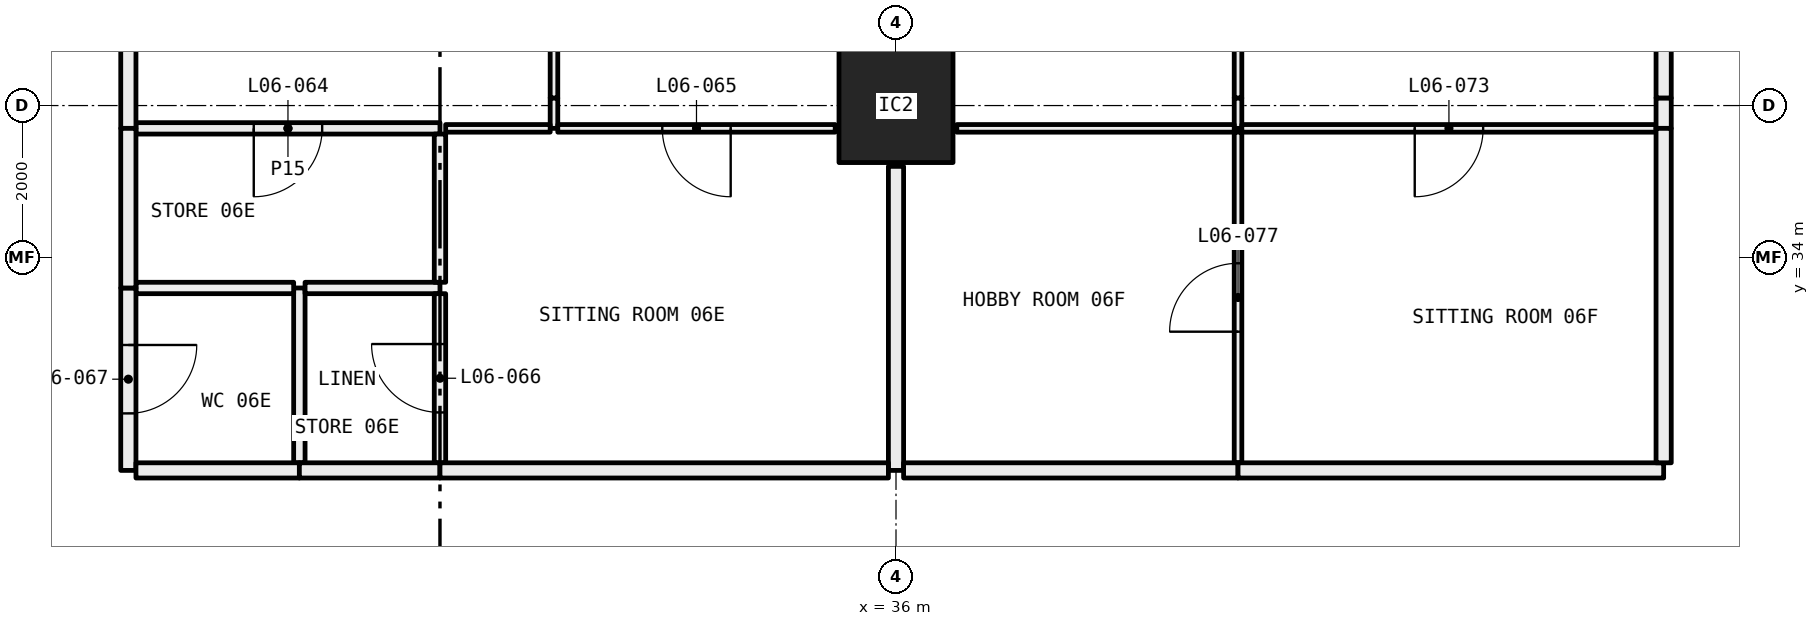
"""IFC4 building model, lengths in metres.
Left out: names, types, materials, properties, quantities, classifications, styles, units other than length and angle.
Written with IfcOpenShell. Run it as: python <this file> out.ifc"""

import sys

from ifc_helpers import new_model, si_unit, direction, frame, frame_2d, origin, origin_2d, place, context, subcontext, project, spatial, rectangle, hollow_rectangle, extrude, element, fill, save


model = new_model("IFC4")
c1 = context("Model", 3, precision=1e-05, world=origin(), true_north=direction((0.0, 1.0)))
c2 = subcontext(c1, "Body", "Model", "MODEL_VIEW")
j1 = project(units=[si_unit("LENGTHUNIT", "METRE"), si_unit("PLANEANGLEUNIT", "RADIAN")], contexts=[c1])
p1 = place(None, origin())
s1 = spatial("IfcSite", under=j1, at=p1, CompositionType="ELEMENT")
p2 = place(p1, origin())
s2 = spatial("IfcBuilding", under=s1, at=p2, CompositionType="ELEMENT")
p3 = place(p2, frame((0.0, 0.0, 33.45)))
s3 = spatial("IfcBuildingStorey", under=s2, at=p3, CompositionType="ELEMENT", Elevation=33.45)
p4 = place(p3, frame((36.0, 36.0, 0.0), z_axis=(0.0, 0.0, 1.0), x_axis=(1.0, 0.0, 0.0)))
e1 = element("IfcColumn", 1, at=p4, inside=s3, PredefinedType="COLUMN", context=c2, shape_type="SweptSolid", body=[
    extrude(hollow_rectangle(XDim=1.5, YDim=1.5, WallThickness=0.065, at=origin_2d()), origin(), (0.0, 0.0, 1.0), 3.05),
])
p5 = place(p3, frame((31.5, 35.7, 0.0), z_axis=(0.0, 0.0, 1.0), x_axis=(0.0, 1.0, 0.0)))
e2 = element("IfcWall", 2, at=p5, inside=s3, PredefinedType="PARTITIONING", context=c2, shape_type="SweptSolid", body=[
    extrude(rectangle(XDim=0.4, YDim=0.1, at=frame_2d((0.2, 0.0))), origin(), (0.0, 0.0, 1.0), 2.45),
])
p6 = place(p3, frame((31.5, 36.1, 0.0), z_axis=(0.0, 0.0, 1.0), x_axis=(0.0, 1.0, 0.0)))
e3 = element("IfcWall", 3, at=p6, inside=s3, PredefinedType="PARTITIONING", context=c2, shape_type="SweptSolid", body=[
    extrude(rectangle(XDim=5.825, YDim=0.1, at=frame_2d((2.913, 0.0))), origin(), (0.0, 0.0, 1.0), 3.05),
])
p7 = place(p6, frame((2.462, 0.0, 0.0)))
e4 = element("IfcOpeningElement", 4, at=p7, cuts=e3, PredefinedType="OPENING", context=c2, shape_type="SweptSolid", body=[
    extrude(rectangle(XDim=0.9, YDim=2.1, at=frame_2d((0.45, 1.05))), frame((0.0, 0.06, 0.0), z_axis=(0.0, -1.0, 0.0), x_axis=(1.0, 0.0, 0.0)), (0.0, 0.0, 1.0), 0.12),
])
p8 = place(p3, frame((26.0, 35.7, 0.0), z_axis=(0.0, 0.0, 1.0), x_axis=(1.0, 0.0, 0.0)))
e5 = element("IfcWall", 5, at=p8, inside=s3, PredefinedType="PARTITIONING", context=c2, shape_type="SweptSolid", body=[
    extrude(rectangle(XDim=4.0, YDim=0.15, at=frame_2d((2.0, 0.0))), origin(), (0.0, 0.0, 1.0), 3.05),
])
p9 = place(p8, frame((1.55, 0.0, 0.0)))
e6 = element("IfcOpeningElement", 6, at=p9, cuts=e5, PredefinedType="OPENING", context=c2, shape_type="SweptSolid", body=[
    extrude(rectangle(XDim=0.9, YDim=2.1, at=frame_2d((0.45, 1.05))), frame((0.0, 0.085, 0.0), z_axis=(0.0, -1.0, 0.0), x_axis=(1.0, 0.0, 0.0)), (0.0, 0.0, 1.0), 0.17),
])
p10 = place(p3, frame((30.075, 35.7, 0.0), z_axis=(0.0, 0.0, 1.0), x_axis=(1.0, 0.0, 0.0)))
e7 = element("IfcWall", 7, at=p10, inside=s3, PredefinedType="PARTITIONING", context=c2, shape_type="SweptSolid", body=[
    extrude(rectangle(XDim=1.375, YDim=0.1, at=frame_2d((0.688, 0.0))), origin(), (0.0, 0.0, 1.0), 3.05),
])
p11 = place(p3, frame((25.9, 41.9, 0.0), z_axis=(0.0, 0.0, 1.0), x_axis=(0.0, -1.0, 0.0)))
e8 = element("IfcWall", 8, at=p11, inside=s3, PredefinedType="PARTITIONING", context=c2, shape_type="SweptSolid", body=[
    extrude(rectangle(XDim=6.2, YDim=0.2, at=frame_2d((3.1, 0.0))), origin(), (0.0, 0.0, 1.0), 2.45),
])
p12 = place(p3, frame((31.55, 35.7, 0.0), z_axis=(0.0, 0.0, 1.0), x_axis=(1.0, 0.0, 0.0)))
e9 = element("IfcWall", 9, at=p12, inside=s3, PredefinedType="PARTITIONING", context=c2, shape_type="SweptSolid", body=[
    extrude(rectangle(XDim=3.65, YDim=0.1, at=frame_2d((1.825, 0.0))), origin(), (0.0, 0.0, 1.0), 3.05),
])
p13 = place(p12, frame((1.375, 0.0, 0.0)))
e10 = element("IfcOpeningElement", 10, at=p13, cuts=e9, PredefinedType="OPENING", context=c2, shape_type="SweptSolid", body=[
    extrude(rectangle(XDim=0.9, YDim=2.1, at=frame_2d((0.45, 1.05))), frame((0.0, 0.06, 0.0), z_axis=(0.0, -1.0, 0.0), x_axis=(1.0, 0.0, 0.0)), (0.0, 0.0, 1.0), 0.12),
])
p14 = place(p3, frame((28.15, 31.3, 0.0), z_axis=(0.0, 0.0, 1.0), x_axis=(0.0, 1.0, 0.0)))
e11 = element("IfcWall", 11, at=p14, inside=s3, PredefinedType="PARTITIONING", context=c2, shape_type="SweptSolid", body=[
    extrude(rectangle(XDim=2.3, YDim=0.15, at=frame_2d((1.15, 0.0))), origin(), (0.0, 0.0, 1.0), 3.05),
])
p15 = place(p3, frame((28.075, 33.6, 0.0), z_axis=(0.0, 0.0, 1.0), x_axis=(-1.0, 0.0, 0.0)))
e12 = element("IfcWall", 12, at=p15, inside=s3, PredefinedType="PARTITIONING", context=c2, shape_type="SweptSolid", body=[
    extrude(rectangle(XDim=2.075, YDim=0.15, at=frame_2d((1.038, 0.0))), origin(), (0.0, 0.0, 1.0), 3.05),
])
p16 = place(p3, frame((25.9, 33.6, 0.0), z_axis=(0.0, 0.0, 1.0), x_axis=(0.0, -1.0, 0.0)))
e13 = element("IfcWall", 13, at=p16, inside=s3, PredefinedType="PARTITIONING", context=c2, shape_type="SweptSolid", body=[
    extrude(rectangle(XDim=2.4, YDim=0.2, at=frame_2d((1.2, 0.0))), origin(), (0.0, 0.0, 1.0), 3.05),
])
p17 = place(p16, frame((0.75, 0.0, 0.0)))
e14 = element("IfcOpeningElement", 14, at=p17, cuts=e13, PredefinedType="OPENING", context=c2, shape_type="SweptSolid", body=[
    extrude(rectangle(XDim=0.9, YDim=2.1, at=frame_2d((0.45, 1.05))), frame((0.0, 0.11, 0.0), z_axis=(0.0, -1.0, 0.0), x_axis=(1.0, 0.0, 0.0)), (0.0, 0.0, 1.0), 0.22),
])
p18 = place(p3, frame((26.0, 31.2, 0.0), z_axis=(0.0, 0.0, 1.0), x_axis=(1.0, 0.0, 0.0)))
e15 = element("IfcWall", 15, at=p18, inside=s3, PredefinedType="PARTITIONING", context=c2, shape_type="SweptSolid", body=[
    extrude(rectangle(XDim=2.15, YDim=0.2, at=frame_2d((1.075, 0.0))), origin(), (0.0, 0.0, 1.0), 3.05),
])
p19 = place(p3, frame((30.0, 33.6, 0.0), z_axis=(0.0, 0.0, 1.0), x_axis=(-1.0, 0.0, 0.0)))
e16 = element("IfcWall", 16, at=p19, inside=s3, PredefinedType="PARTITIONING", context=c2, shape_type="SweptSolid", body=[
    extrude(rectangle(XDim=1.775, YDim=0.15, at=frame_2d((0.887, 0.0))), origin(), (0.0, 0.0, 1.0), 3.05),
])
p20 = place(p3, frame((30.0, 31.3, 0.0), z_axis=(0.0, 0.0, 1.0), x_axis=(0.0, 1.0, 0.0)))
e17 = element("IfcWall", 17, at=p20, inside=s3, PredefinedType="PARTITIONING", context=c2, shape_type="SweptSolid", body=[
    extrude(rectangle(XDim=2.225, YDim=0.15, at=frame_2d((1.112, 0.0))), origin(), (0.0, 0.0, 1.0), 3.05),
])
p21 = place(p20, frame((0.663, 0.0, 0.0)))
e18 = element("IfcOpeningElement", 18, at=p21, cuts=e17, PredefinedType="OPENING", context=c2, shape_type="SweptSolid", body=[
    extrude(rectangle(XDim=0.9, YDim=2.1, at=frame_2d((0.45, 1.05))), frame((0.0, 0.085, 0.0), z_axis=(0.0, -1.0, 0.0), x_axis=(1.0, 0.0, 0.0)), (0.0, 0.0, 1.0), 0.17),
])
p22 = place(p3, frame((28.15, 31.2, 0.0), z_axis=(0.0, 0.0, 1.0), x_axis=(1.0, 0.0, 0.0)))
e19 = element("IfcWall", 19, at=p22, inside=s3, PredefinedType="PARTITIONING", context=c2, shape_type="SweptSolid", body=[
    extrude(rectangle(XDim=1.85, YDim=0.2, at=frame_2d((0.925, 0.0))), origin(), (0.0, 0.0, 1.0), 3.05),
])
p23 = place(p3, frame((30.0, 33.675, 0.0), z_axis=(0.0, 0.0, 1.0), x_axis=(0.0, 1.0, 0.0)))
e20 = element("IfcWall", 20, at=p23, inside=s3, PredefinedType="PARTITIONING", context=c2, shape_type="SweptSolid", body=[
    extrude(rectangle(XDim=1.95, YDim=0.15, at=frame_2d((0.975, 0.0))), origin(), (0.0, 0.0, 1.0), 3.05),
])
p24 = place(p3, frame((25.9, 35.7, 0.0), z_axis=(0.0, 0.0, 1.0), x_axis=(0.0, -1.0, 0.0)))
e21 = element("IfcWall", 21, at=p24, inside=s3, PredefinedType="PARTITIONING", context=c2, shape_type="SweptSolid", body=[
    extrude(rectangle(XDim=2.1, YDim=0.2, at=frame_2d((1.05, 0.0))), origin(), (0.0, 0.0, 1.0), 3.05),
])
p25 = place(p3, frame((36.0, 31.2, 0.0), z_axis=(0.0, 0.0, 1.0), x_axis=(0.0, 1.0, 0.0)))
e22 = element("IfcWall", 22, at=p25, inside=s3, PredefinedType="PARTITIONING", context=c2, shape_type="SweptSolid", body=[
    extrude(rectangle(XDim=4.0, YDim=0.2, at=frame_2d((2.0, 0.0))), origin(), (0.0, 0.0, 1.0), 2.45),
])
p26 = place(p3, frame((30.0, 31.2, 0.0), z_axis=(0.0, 0.0, 1.0), x_axis=(1.0, 0.0, 0.0)))
e23 = element("IfcWall", 23, at=p26, inside=s3, PredefinedType="PARTITIONING", context=c2, shape_type="SweptSolid", body=[
    extrude(rectangle(XDim=5.9, YDim=0.2, at=frame_2d((2.95, 0.0))), origin(), (0.0, 0.0, 1.0), 3.05),
])
p27 = place(p3, frame((40.5, 35.7, 0.0), z_axis=(0.0, 0.0, 1.0), x_axis=(0.0, 1.0, 0.0)))
e24 = element("IfcWall", 24, at=p27, inside=s3, PredefinedType="PARTITIONING", context=c2, shape_type="SweptSolid", body=[
    extrude(rectangle(XDim=0.4, YDim=0.1, at=frame_2d((0.2, 0.0))), origin(), (0.0, 0.0, 1.0), 2.45),
])
p28 = place(p3, frame((40.5, 36.1, 0.0), z_axis=(0.0, 0.0, 1.0), x_axis=(0.0, 1.0, 0.0)))
e25 = element("IfcWall", 25, at=p28, inside=s3, PredefinedType="PARTITIONING", context=c2, shape_type="SweptSolid", body=[
    extrude(rectangle(XDim=5.825, YDim=0.1, at=frame_2d((2.913, 0.0))), origin(), (0.0, 0.0, 1.0), 3.05),
])
p29 = place(p28, frame((2.462, 0.0, 0.0)))
e26 = element("IfcOpeningElement", 26, at=p29, cuts=e25, PredefinedType="OPENING", context=c2, shape_type="SweptSolid", body=[
    extrude(rectangle(XDim=0.9, YDim=2.1, at=frame_2d((0.45, 1.05))), frame((0.0, 0.06, 0.0), z_axis=(0.0, -1.0, 0.0), x_axis=(1.0, 0.0, 0.0)), (0.0, 0.0, 1.0), 0.12),
])
p30 = place(p3, frame((36.8, 35.7, 0.0), z_axis=(0.0, 0.0, 1.0), x_axis=(1.0, 0.0, 0.0)))
e27 = element("IfcWall", 27, at=p30, inside=s3, PredefinedType="PARTITIONING", context=c2, shape_type="SweptSolid", body=[
    extrude(rectangle(XDim=3.65, YDim=0.1, at=frame_2d((1.825, 0.0))), origin(), (0.0, 0.0, 1.0), 3.05),
])
p31 = place(p3, frame((40.55, 35.7, 0.0), z_axis=(0.0, 0.0, 1.0), x_axis=(1.0, 0.0, 0.0)))
e28 = element("IfcWall", 28, at=p31, inside=s3, PredefinedType="PARTITIONING", context=c2, shape_type="SweptSolid", body=[
    extrude(rectangle(XDim=5.45, YDim=0.1, at=frame_2d((2.725, 0.0))), origin(), (0.0, 0.0, 1.0), 3.05),
])
p32 = place(p31, frame((2.275, 0.0, 0.0)))
e29 = element("IfcOpeningElement", 29, at=p32, cuts=e28, PredefinedType="OPENING", context=c2, shape_type="SweptSolid", body=[
    extrude(rectangle(XDim=0.9, YDim=2.1, at=frame_2d((0.45, 1.05))), frame((0.0, 0.06, 0.0), z_axis=(0.0, -1.0, 0.0), x_axis=(1.0, 0.0, 0.0)), (0.0, 0.0, 1.0), 0.12),
])
p33 = place(p3, frame((46.1, 35.7, 0.0), z_axis=(0.0, 0.0, 1.0), x_axis=(0.0, 1.0, 0.0)))
e30 = element("IfcWall", 30, at=p33, inside=s3, PredefinedType="PARTITIONING", context=c2, shape_type="SweptSolid", body=[
    extrude(rectangle(XDim=0.4, YDim=0.2, at=frame_2d((0.2, 0.0))), origin(), (0.0, 0.0, 1.0), 2.45),
])
p34 = place(p3, frame((46.1, 36.1, 0.0), z_axis=(0.0, 0.0, 1.0), x_axis=(0.0, 1.0, 0.0)))
e31 = element("IfcWall", 31, at=p34, inside=s3, PredefinedType="PARTITIONING", context=c2, shape_type="SweptSolid", body=[
    extrude(rectangle(XDim=5.8, YDim=0.2, at=frame_2d((2.9, 0.0))), origin(), (0.0, 0.0, 1.0), 3.05),
])
p35 = place(p3, frame((40.5, 31.3, 0.0), z_axis=(0.0, 0.0, 1.0), x_axis=(0.0, 1.0, 0.0)))
e32 = element("IfcWall", 32, at=p35, inside=s3, PredefinedType="PARTITIONING", context=c2, shape_type="SweptSolid", body=[
    extrude(rectangle(XDim=4.35, YDim=0.1, at=frame_2d((2.175, 0.0))), origin(), (0.0, 0.0, 1.0), 3.05),
])
p36 = place(p35, frame((1.725, 0.0, 0.0)))
e33 = element("IfcOpeningElement", 33, at=p36, cuts=e32, PredefinedType="OPENING", context=c2, shape_type="SweptSolid", body=[
    extrude(rectangle(XDim=0.9, YDim=2.1, at=frame_2d((0.45, 1.05))), frame((0.0, 0.06, 0.0), z_axis=(0.0, -1.0, 0.0), x_axis=(1.0, 0.0, 0.0)), (0.0, 0.0, 1.0), 0.12),
])
p37 = place(p3, frame((36.1, 31.2, 0.0), z_axis=(0.0, 0.0, 1.0), x_axis=(1.0, 0.0, 0.0)))
e34 = element("IfcWall", 34, at=p37, inside=s3, PredefinedType="PARTITIONING", context=c2, shape_type="SweptSolid", body=[
    extrude(rectangle(XDim=4.4, YDim=0.2, at=frame_2d((2.2, 0.0))), origin(), (0.0, 0.0, 1.0), 3.05),
])
p38 = place(p3, frame((40.5, 31.2, 0.0), z_axis=(0.0, 0.0, 1.0), x_axis=(1.0, 0.0, 0.0)))
e35 = element("IfcWall", 35, at=p38, inside=s3, PredefinedType="PARTITIONING", context=c2, shape_type="SweptSolid", body=[
    extrude(rectangle(XDim=5.6, YDim=0.2, at=frame_2d((2.8, 0.0))), origin(), (0.0, 0.0, 1.0), 3.05),
])
p39 = place(p3, frame((46.1, 31.3, 0.0), z_axis=(0.0, 0.0, 1.0), x_axis=(0.0, 1.0, 0.0)))
e36 = element("IfcWall", 36, at=p39, inside=s3, PredefinedType="PARTITIONING", context=c2, shape_type="SweptSolid", body=[
    extrude(rectangle(XDim=4.4, YDim=0.2, at=frame_2d((2.2, 0.0))), origin(), (0.0, 0.0, 1.0), 3.05),
])
p40 = place(p9, frame((0.9, 0.0, 0.0), x_axis=(-1.0, 0.0, 0.0)))
e37 = element("IfcDoor", 37, at=p40, inside=s3, OperationType="SINGLE_SWING_LEFT", PredefinedType="DOOR", context=c2, shape_type="SweptSolid", body=[
    extrude(rectangle(XDim=0.9, YDim=2.1, at=frame_2d((0.45, 1.05))), frame((0.0, 0.025, 0.0), z_axis=(0.0, -1.0, 0.0), x_axis=(1.0, 0.0, 0.0)), (0.0, 0.0, 1.0), 0.05),
])
fill(e6, e37)
p41 = place(p13, frame((0.9, 0.0, 0.0), x_axis=(-1.0, 0.0, 0.0)))
e38 = element("IfcDoor", 38, at=p41, inside=s3, OperationType="SINGLE_SWING_RIGHT", PredefinedType="DOOR", context=c2, shape_type="SweptSolid", body=[
    extrude(rectangle(XDim=0.9, YDim=2.1, at=frame_2d((0.45, 1.05))), frame((0.0, 0.025, 0.0), z_axis=(0.0, -1.0, 0.0), x_axis=(1.0, 0.0, 0.0)), (0.0, 0.0, 1.0), 0.05),
])
fill(e10, e38)
p42 = place(p21, origin())
e39 = element("IfcDoor", 39, at=p42, inside=s3, OperationType="SINGLE_SWING_LEFT", PredefinedType="DOOR", context=c2, shape_type="SweptSolid", body=[
    extrude(rectangle(XDim=0.9, YDim=2.1, at=frame_2d((0.45, 1.05))), frame((0.0, 0.025, 0.0), z_axis=(0.0, -1.0, 0.0), x_axis=(1.0, 0.0, 0.0)), (0.0, 0.0, 1.0), 0.05),
])
fill(e18, e39)
p43 = place(p17, origin())
e40 = element("IfcDoor", 40, at=p43, inside=s3, OperationType="SINGLE_SWING_RIGHT", PredefinedType="DOOR", context=c2, shape_type="SweptSolid", body=[
    extrude(rectangle(XDim=0.9, YDim=2.1, at=frame_2d((0.45, 1.05))), frame((0.0, 0.025, 0.0), z_axis=(0.0, -1.0, 0.0), x_axis=(1.0, 0.0, 0.0)), (0.0, 0.0, 1.0), 0.05),
])
fill(e14, e40)
p44 = place(p32, frame((0.9, 0.0, 0.0), x_axis=(-1.0, 0.0, 0.0)))
e41 = element("IfcDoor", 41, at=p44, inside=s3, OperationType="SINGLE_SWING_LEFT", PredefinedType="DOOR", context=c2, shape_type="SweptSolid", body=[
    extrude(rectangle(XDim=0.9, YDim=2.1, at=frame_2d((0.45, 1.05))), frame((0.0, 0.025, 0.0), z_axis=(0.0, -1.0, 0.0), x_axis=(1.0, 0.0, 0.0)), (0.0, 0.0, 1.0), 0.05),
])
fill(e29, e41)
p45 = place(p36, origin())
e42 = element("IfcDoor", 42, at=p45, inside=s3, OperationType="SINGLE_SWING_RIGHT", PredefinedType="DOOR", context=c2, shape_type="SweptSolid", body=[
    extrude(rectangle(XDim=0.9, YDim=2.1, at=frame_2d((0.45, 1.05))), frame((0.0, 0.025, 0.0), z_axis=(0.0, -1.0, 0.0), x_axis=(1.0, 0.0, 0.0)), (0.0, 0.0, 1.0), 0.05),
])
fill(e33, e42)
save(model, sys.argv[1])
